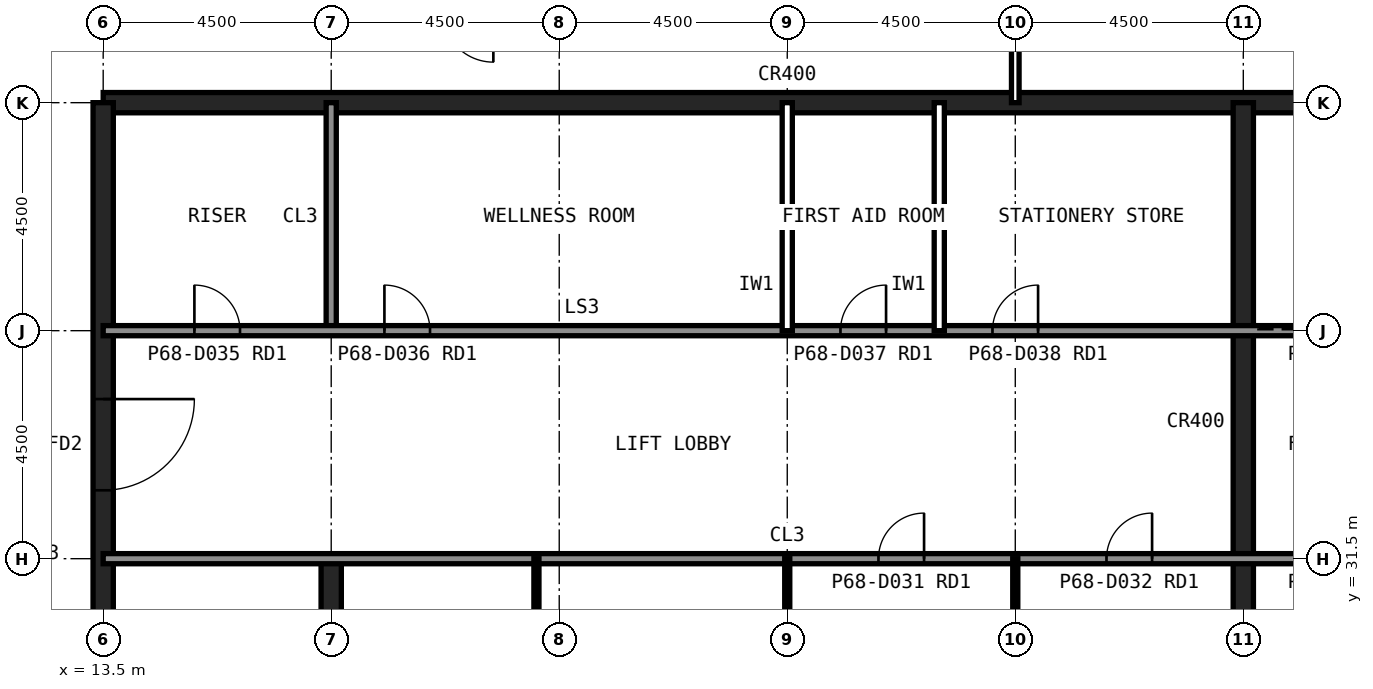
"""IFC4 building model, lengths in metres.
Left out: names, types, materials, properties, quantities, classifications, styles, units other than length and angle.
Written with IfcOpenShell. Run it as: python <this file> out.ifc"""

import sys

from ifc_helpers import new_model, si_unit, direction, frame, frame_2d, origin, place, context, subcontext, project, spatial, rectangle, extrude, element, fill, save


model = new_model("IFC4")
c1 = context("Model", 3, precision=1e-05, world=origin(), true_north=direction((0.0, 1.0)))
c2 = subcontext(c1, "Body", "Model", "MODEL_VIEW")
j1 = project(units=[si_unit("LENGTHUNIT", "METRE"), si_unit("PLANEANGLEUNIT", "RADIAN")], contexts=[c1])
p1 = place(None, origin())
s1 = spatial("IfcSite", under=j1, at=p1, CompositionType="ELEMENT")
p2 = place(p1, origin())
s2 = spatial("IfcBuilding", under=s1, at=p2, CompositionType="ELEMENT")
p3 = place(p2, frame((0.0, 0.0, 286.6)))
s3 = spatial("IfcBuildingStorey", under=s2, at=p3, CompositionType="ELEMENT", Elevation=286.6)
p4 = place(p3, frame((40.5, 40.5, 0.0), z_axis=(0.0, 0.0, 1.0), x_axis=(-1.0, 0.0, 0.0)))
e1 = element("IfcWall", 1, at=p4, inside=s3, PredefinedType="SHEAR", context=c2, shape_type="SweptSolid", body=[
    extrude(rectangle(XDim=27.0, YDim=0.4, at=frame_2d((13.5, 0.0))), origin(), (0.0, 0.0, 1.0), 4.0),
])
p5 = place(p3, frame((13.5, 40.5, 0.0), z_axis=(0.0, 0.0, 1.0), x_axis=(0.0, -1.0, 0.0)))
e2 = element("IfcWall", 2, at=p5, inside=s3, PredefinedType="SHEAR", context=c2, shape_type="SweptSolid", body=[
    extrude(rectangle(XDim=27.0, YDim=0.4, at=frame_2d((13.5, 0.0))), origin(), (0.0, 0.0, 1.0), 4.0),
])
p6 = place(p5, frame((19.65, 0.0, 0.0)))
e3 = element("IfcOpeningElement", 3, at=p6, cuts=e2, PredefinedType="OPENING", context=c2, shape_type="SweptSolid", body=[
    extrude(rectangle(XDim=1.2, YDim=2.1, at=frame_2d((0.6, 1.05))), frame((0.0, 0.21, 0.0), z_axis=(0.0, -1.0, 0.0), x_axis=(1.0, 0.0, 0.0)), (0.0, 0.0, 1.0), 0.42),
])
p7 = place(p5, frame((5.85, 0.0, 0.0)))
e4 = element("IfcOpeningElement", 4, at=p7, cuts=e2, PredefinedType="OPENING", context=c2, shape_type="SweptSolid", body=[
    extrude(rectangle(XDim=1.8, YDim=2.1, at=frame_2d((0.9, 1.05))), frame((0.0, 0.21, 0.0), z_axis=(0.0, -1.0, 0.0), x_axis=(1.0, 0.0, 0.0)), (0.0, 0.0, 1.0), 0.42),
])
p8 = place(p3, frame((18.0, 13.5, 0.0), z_axis=(0.0, 0.0, 1.0), x_axis=(0.0, 1.0, 0.0)))
e5 = element("IfcWall", 5, at=p8, inside=s3, PredefinedType="SHEAR", context=c2, shape_type="SweptSolid", body=[
    extrude(rectangle(XDim=18.0, YDim=0.4, at=frame_2d((9.0, 0.0))), origin(), (0.0, 0.0, 1.0), 4.0),
])
p9 = place(p3, frame((18.0, 36.0, 0.0), z_axis=(0.0, 0.0, 1.0), x_axis=(0.0, 1.0, 0.0)))
e6 = element("IfcWall", 6, at=p9, inside=s3, PredefinedType="SOLIDWALL", context=c2, shape_type="SweptSolid", body=[
    extrude(rectangle(XDim=4.5, YDim=0.2, at=frame_2d((2.25, 0.0))), origin(), (0.0, 0.0, 1.0), 3.84),
])
p10 = place(p3, frame((36.0, 22.5, 0.0), z_axis=(0.0, 0.0, 1.0), x_axis=(0.0, 1.0, 0.0)))
e7 = element("IfcWall", 7, at=p10, inside=s3, PredefinedType="SHEAR", context=c2, shape_type="SweptSolid", body=[
    extrude(rectangle(XDim=18.0, YDim=0.4, at=frame_2d((9.0, 0.0))), origin(), (0.0, 0.0, 1.0), 4.0),
])
p11 = place(p3, frame((13.5, 36.0, 0.0), z_axis=(0.0, 0.0, 1.0), x_axis=(1.0, 0.0, 0.0)))
e8 = element("IfcWall", 8, at=p11, inside=s3, PredefinedType="SOLIDWALL", context=c2, shape_type="SweptSolid", body=[
    extrude(rectangle(XDim=27.0, YDim=0.2, at=frame_2d((13.5, 0.0))), origin(), (0.0, 0.0, 1.0), 3.84),
])
p12 = place(p11, frame((1.8, 0.0, 0.0)))
e9 = element("IfcOpeningElement", 9, at=p12, cuts=e8, PredefinedType="OPENING", context=c2, shape_type="SweptSolid", body=[
    extrude(rectangle(XDim=0.9, YDim=2.1, at=frame_2d((0.45, 1.05))), frame((0.0, 0.11, 0.0), z_axis=(0.0, -1.0, 0.0), x_axis=(1.0, 0.0, 0.0)), (0.0, 0.0, 1.0), 0.22),
])
p13 = place(p11, frame((5.55, 0.0, 0.0)))
e10 = element("IfcOpeningElement", 10, at=p13, cuts=e8, PredefinedType="OPENING", context=c2, shape_type="SweptSolid", body=[
    extrude(rectangle(XDim=0.9, YDim=2.1, at=frame_2d((0.45, 1.05))), frame((0.0, 0.11, 0.0), z_axis=(0.0, -1.0, 0.0), x_axis=(1.0, 0.0, 0.0)), (0.0, 0.0, 1.0), 0.22),
])
p14 = place(p11, frame((14.55, 0.0, 0.0)))
e11 = element("IfcOpeningElement", 11, at=p14, cuts=e8, PredefinedType="OPENING", context=c2, shape_type="SweptSolid", body=[
    extrude(rectangle(XDim=0.9, YDim=2.1, at=frame_2d((0.45, 1.05))), frame((0.0, 0.11, 0.0), z_axis=(0.0, -1.0, 0.0), x_axis=(1.0, 0.0, 0.0)), (0.0, 0.0, 1.0), 0.22),
])
p15 = place(p11, frame((17.55, 0.0, 0.0)))
e12 = element("IfcOpeningElement", 12, at=p15, cuts=e8, PredefinedType="OPENING", context=c2, shape_type="SweptSolid", body=[
    extrude(rectangle(XDim=0.9, YDim=2.1, at=frame_2d((0.45, 1.05))), frame((0.0, 0.11, 0.0), z_axis=(0.0, -1.0, 0.0), x_axis=(1.0, 0.0, 0.0)), (0.0, 0.0, 1.0), 0.22),
])
p16 = place(p11, frame((24.1, 0.0, 0.0)))
e13 = element("IfcOpeningElement", 13, at=p16, cuts=e8, PredefinedType="OPENING", context=c2, shape_type="SweptSolid", body=[
    extrude(rectangle(XDim=1.3, YDim=2.2, at=frame_2d((0.65, 1.1))), frame((0.0, 0.11, 0.0), z_axis=(0.0, -1.0, 0.0), x_axis=(1.0, 0.0, 0.0)), (0.0, 0.0, 1.0), 0.22),
])
p17 = place(p3, frame((13.5, 31.5, 0.0), z_axis=(0.0, 0.0, 1.0), x_axis=(1.0, 0.0, 0.0)))
e14 = element("IfcWall", 14, at=p17, inside=s3, PredefinedType="SOLIDWALL", context=c2, shape_type="SweptSolid", body=[
    extrude(rectangle(XDim=27.0, YDim=0.2, at=frame_2d((13.5, 0.0))), origin(), (0.0, 0.0, 1.0), 3.84),
])
p18 = place(p17, frame((24.15, 0.0, 0.0)))
e15 = element("IfcOpeningElement", 15, at=p18, cuts=e14, PredefinedType="OPENING", context=c2, shape_type="SweptSolid", body=[
    extrude(rectangle(XDim=1.2, YDim=2.1, at=frame_2d((0.6, 1.05))), frame((0.0, 0.11, 0.0), z_axis=(0.0, -1.0, 0.0), x_axis=(1.0, 0.0, 0.0)), (0.0, 0.0, 1.0), 0.22),
])
p19 = place(p17, frame((15.3, 0.0, 0.0)))
e16 = element("IfcOpeningElement", 16, at=p19, cuts=e14, PredefinedType="OPENING", context=c2, shape_type="SweptSolid", body=[
    extrude(rectangle(XDim=0.9, YDim=2.1, at=frame_2d((0.45, 1.05))), frame((0.0, 0.11, 0.0), z_axis=(0.0, -1.0, 0.0), x_axis=(1.0, 0.0, 0.0)), (0.0, 0.0, 1.0), 0.22),
])
p20 = place(p17, frame((19.8, 0.0, 0.0)))
e17 = element("IfcOpeningElement", 17, at=p20, cuts=e14, PredefinedType="OPENING", context=c2, shape_type="SweptSolid", body=[
    extrude(rectangle(XDim=0.9, YDim=2.1, at=frame_2d((0.45, 1.05))), frame((0.0, 0.11, 0.0), z_axis=(0.0, -1.0, 0.0), x_axis=(1.0, 0.0, 0.0)), (0.0, 0.0, 1.0), 0.22),
])
for number, where, z_axis, x_axis in (
    (18, (27.0, 36.0, 0.0), (0.0, 0.0, 1.0), (0.0, 1.0, 0.0)),
    (19, (30.0, 36.0, 0.0), (0.0, 0.0, 1.0), (0.0, 1.0, 0.0)),
):
    element("IfcWall", number, at=place(p3, frame(where, z_axis=z_axis, x_axis=x_axis)), inside=s3, PredefinedType="PARTITIONING", context=c2, shape_type="SweptSolid", body=[
        extrude(rectangle(XDim=4.5, YDim=0.2, at=frame_2d((2.25, 0.0))), origin(), (0.0, 0.0, 1.0), 3.84),
    ])
for number, where, z_axis, x_axis in (
    (20, (22.05, 22.5, 0.0), (0.0, 0.0, 1.0), (0.0, 1.0, 0.0)),
    (21, (27.0, 22.5, 0.0), (0.0, 0.0, 1.0), (0.0, 1.0, 0.0)),
    (22, (31.5, 22.5, 0.0), (0.0, 0.0, 1.0), (0.0, 1.0, 0.0)),
):
    element("IfcWall", number, at=place(p3, frame(where, z_axis=z_axis, x_axis=x_axis)), inside=s3, PredefinedType="PLUMBINGWALL", context=c2, shape_type="SweptSolid", body=[
        extrude(rectangle(XDim=9.0, YDim=0.1, at=frame_2d((4.5, 0.0))), origin(), (0.0, 0.0, 1.0), 3.84),
    ])
p21 = place(p3, frame((31.5, 45.0, 0.0), z_axis=(0.0, 0.0, 1.0), x_axis=(0.0, -1.0, 0.0)))
e23 = element("IfcWall", 23, at=p21, inside=s3, PredefinedType="PARTITIONING", context=c2, shape_type="SweptSolid", body=[
    extrude(rectangle(XDim=4.5, YDim=0.15, at=frame_2d((2.25, 0.0))), origin(), (0.0, 0.0, 1.0), 2.989),
])
p22 = place(p21, frame((1.75, 0.0, 0.0)))
e24 = element("IfcOpeningElement", 24, at=p22, cuts=e23, PredefinedType="OPENING", context=c2, shape_type="SweptSolid", body=[
    extrude(rectangle(XDim=1.0, YDim=2.1, at=frame_2d((0.5, 1.05))), frame((0.0, 0.085, 0.0), z_axis=(0.0, -1.0, 0.0), x_axis=(1.0, 0.0, 0.0)), (0.0, 0.0, 1.0), 0.17),
])
p23 = place(p7, origin())
e25 = element("IfcDoor", 25, at=p23, inside=s3, OperationType="SINGLE_SWING_LEFT", PredefinedType="DOOR", context=c2, shape_type="SweptSolid", body=[
    extrude(rectangle(XDim=1.8, YDim=2.1, at=frame_2d((0.9, 1.05))), frame((0.0, 0.025, 0.0), z_axis=(0.0, -1.0, 0.0), x_axis=(1.0, 0.0, 0.0)), (0.0, 0.0, 1.0), 0.05),
])
fill(e4, e25)
p24 = place(p19, origin())
e26 = element("IfcDoor", 26, at=p24, inside=s3, OperationType="SINGLE_SWING_RIGHT", PredefinedType="DOOR", context=c2, shape_type="SweptSolid", body=[
    extrude(rectangle(XDim=0.9, YDim=2.1, at=frame_2d((0.45, 1.05))), frame((0.0, 0.025, 0.0), z_axis=(0.0, -1.0, 0.0), x_axis=(1.0, 0.0, 0.0)), (0.0, 0.0, 1.0), 0.05),
])
fill(e16, e26)
p25 = place(p20, origin())
e27 = element("IfcDoor", 27, at=p25, inside=s3, OperationType="SINGLE_SWING_RIGHT", PredefinedType="DOOR", context=c2, shape_type="SweptSolid", body=[
    extrude(rectangle(XDim=0.9, YDim=2.1, at=frame_2d((0.45, 1.05))), frame((0.0, 0.025, 0.0), z_axis=(0.0, -1.0, 0.0), x_axis=(1.0, 0.0, 0.0)), (0.0, 0.0, 1.0), 0.05),
])
fill(e17, e27)
p26 = place(p12, origin())
e28 = element("IfcDoor", 28, at=p26, inside=s3, OperationType="SINGLE_SWING_LEFT", PredefinedType="DOOR", context=c2, shape_type="SweptSolid", body=[
    extrude(rectangle(XDim=0.9, YDim=2.1, at=frame_2d((0.45, 1.05))), frame((0.0, 0.025, 0.0), z_axis=(0.0, -1.0, 0.0), x_axis=(1.0, 0.0, 0.0)), (0.0, 0.0, 1.0), 0.05),
])
fill(e9, e28)
p27 = place(p13, origin())
e29 = element("IfcDoor", 29, at=p27, inside=s3, OperationType="SINGLE_SWING_LEFT", PredefinedType="DOOR", context=c2, shape_type="SweptSolid", body=[
    extrude(rectangle(XDim=0.9, YDim=2.1, at=frame_2d((0.45, 1.05))), frame((0.0, 0.025, 0.0), z_axis=(0.0, -1.0, 0.0), x_axis=(1.0, 0.0, 0.0)), (0.0, 0.0, 1.0), 0.05),
])
fill(e10, e29)
p28 = place(p14, origin())
e30 = element("IfcDoor", 30, at=p28, inside=s3, OperationType="SINGLE_SWING_RIGHT", PredefinedType="DOOR", context=c2, shape_type="SweptSolid", body=[
    extrude(rectangle(XDim=0.9, YDim=2.1, at=frame_2d((0.45, 1.05))), frame((0.0, 0.025, 0.0), z_axis=(0.0, -1.0, 0.0), x_axis=(1.0, 0.0, 0.0)), (0.0, 0.0, 1.0), 0.05),
])
fill(e11, e30)
p29 = place(p15, origin())
e31 = element("IfcDoor", 31, at=p29, inside=s3, OperationType="SINGLE_SWING_RIGHT", PredefinedType="DOOR", context=c2, shape_type="SweptSolid", body=[
    extrude(rectangle(XDim=0.9, YDim=2.1, at=frame_2d((0.45, 1.05))), frame((0.0, 0.025, 0.0), z_axis=(0.0, -1.0, 0.0), x_axis=(1.0, 0.0, 0.0)), (0.0, 0.0, 1.0), 0.05),
])
fill(e12, e31)
save(model, sys.argv[1])
